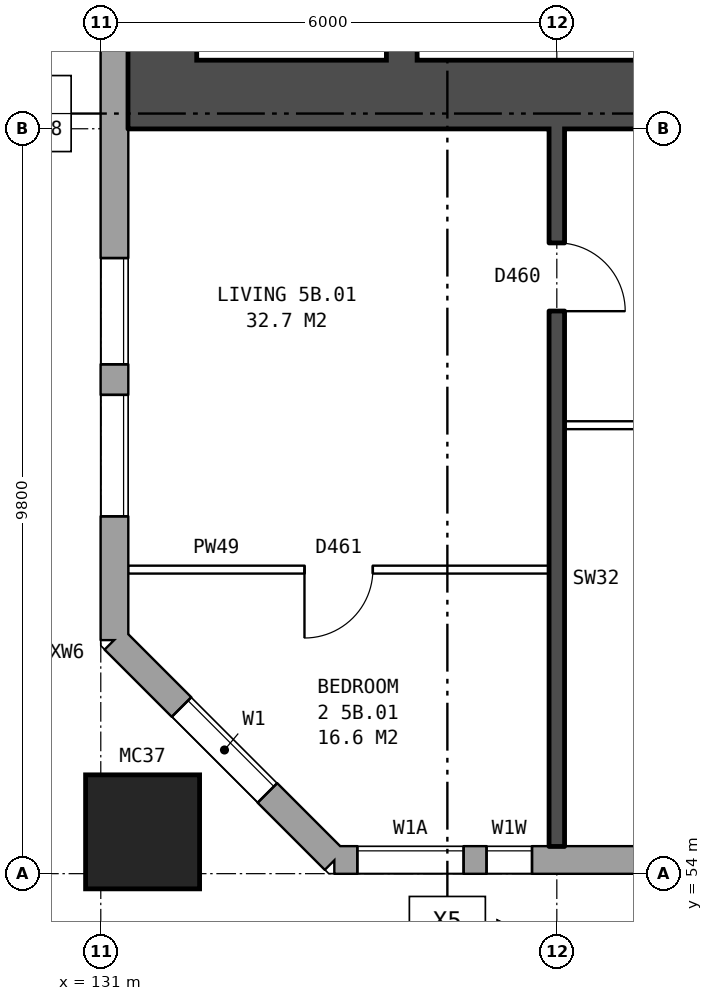
"""IFC4 building model, lengths in metres.
Left out: names, types, materials, properties, quantities, classifications, styles, units other than length and angle.
Written with IfcOpenShell. Run it as: python <this file> out.ifc"""

import sys

from ifc_helpers import new_model, si_unit, direction, frame, frame_2d, origin, origin_2d, place, context, subcontext, project, spatial, rectangle, hollow_rectangle, extrude, element, fill, save


model = new_model("IFC4")
c1 = context("Model", 3, precision=1e-05, world=origin(), true_north=direction((0.0, 1.0)))
c2 = subcontext(c1, "Body", "Model", "MODEL_VIEW")
j1 = project(units=[si_unit("LENGTHUNIT", "METRE"), si_unit("PLANEANGLEUNIT", "RADIAN")], contexts=[c1])
p1 = place(None, origin())
s1 = spatial("IfcSite", under=j1, at=p1, CompositionType="ELEMENT")
p2 = place(p1, origin())
s2 = spatial("IfcBuilding", under=s1, at=p2, CompositionType="ELEMENT")
p3 = place(p2, frame((0.0, 0.0, 22.6)))
s3 = spatial("IfcBuildingStorey", under=s2, at=p3, CompositionType="ELEMENT", Elevation=22.6)
p4 = place(p3, frame((131.55, 54.55, 0.0), z_axis=(0.0, 0.0, 1.0), x_axis=(1.0, 0.0, 0.0)))
e1 = element("IfcColumn", 1, at=p4, inside=s3, PredefinedType="COLUMN", context=c2, shape_type="SweptSolid", body=[
    extrude(hollow_rectangle(XDim=1.5, YDim=1.5, WallThickness=0.08, at=origin_2d()), origin(), (0.0, 0.0, 1.0), 3.1),
])
p5 = place(p3, frame((131.18, 57.075, 0.0), z_axis=(0.0, 0.0, 1.0), x_axis=(0.707106781187, -0.707106781187, 0.0)))
e2 = element("IfcWall", 2, at=p5, inside=s3, PredefinedType="STANDARD", context=c2, shape_type="SweptSolid", body=[
    extrude(rectangle(XDim=4.094, YDim=0.36, at=frame_2d((2.047, 0.0))), origin(), (0.0, 0.0, 1.0), 2.85),
])
p6 = place(p5, frame((1.247, 0.0, 0.8)))
e3 = element("IfcOpeningElement", 3, at=p6, cuts=e2, PredefinedType="OPENING", context=c2, shape_type="SweptSolid", body=[
    extrude(rectangle(XDim=1.6, YDim=1.8, at=frame_2d((0.8, 0.9))), frame((0.0, 0.19, 0.0), z_axis=(0.0, -1.0, 0.0), x_axis=(1.0, 0.0, 0.0)), (0.0, 0.0, 1.0), 0.38),
])
p7 = place(p3, frame((134.075, 54.18, 0.0), z_axis=(0.0, 0.0, 1.0), x_axis=(1.0, 0.0, 0.0)))
e4 = element("IfcWall", 4, at=p7, inside=s3, PredefinedType="STANDARD", context=c2, shape_type="SweptSolid", body=[
    extrude(rectangle(XDim=40.601, YDim=0.36, at=frame_2d((20.3, 0.0))), origin(), (0.0, 0.0, 1.0), 2.85),
])
p8 = place(p7, frame((0.3, 0.0, 0.8)))
e5 = element("IfcOpeningElement", 5, at=p8, cuts=e4, PredefinedType="OPENING", context=c2, shape_type="SweptSolid", body=[
    extrude(rectangle(XDim=1.4, YDim=1.8, at=frame_2d((0.7, 0.9))), frame((0.0, 0.19, 0.0), z_axis=(0.0, -1.0, 0.0), x_axis=(1.0, 0.0, 0.0)), (0.0, 0.0, 1.0), 0.38),
])
p9 = place(p7, frame((4.125, 0.0, 0.8)))
e6 = element("IfcOpeningElement", 6, at=p9, cuts=e4, PredefinedType="OPENING", context=c2, shape_type="SweptSolid", body=[
    extrude(rectangle(XDim=0.8, YDim=0.9, at=frame_2d((0.4, 0.45))), frame((0.0, 0.19, 0.0), z_axis=(0.0, -1.0, 0.0), x_axis=(1.0, 0.0, 0.0)), (0.0, 0.0, 1.0), 0.38),
])
p10 = place(p7, frame((6.625, 0.0, 0.8)))
e7 = element("IfcOpeningElement", 7, at=p10, cuts=e4, PredefinedType="OPENING", context=c2, shape_type="SweptSolid", body=[
    extrude(rectangle(XDim=1.6, YDim=1.8, at=frame_2d((0.8, 0.9))), frame((0.0, 0.19, 0.0), z_axis=(0.0, -1.0, 0.0), x_axis=(1.0, 0.0, 0.0)), (0.0, 0.0, 1.0), 0.38),
])
p11 = place(p7, frame((9.625, 0.0, 0.8)))
e8 = element("IfcOpeningElement", 8, at=p11, cuts=e4, PredefinedType="OPENING", context=c2, shape_type="SweptSolid", body=[
    extrude(rectangle(XDim=1.6, YDim=1.8, at=frame_2d((0.8, 0.9))), frame((0.0, 0.19, 0.0), z_axis=(0.0, -1.0, 0.0), x_axis=(1.0, 0.0, 0.0)), (0.0, 0.0, 1.0), 0.38),
])
p12 = place(p7, frame((12.625, 0.0, 0.8)))
e9 = element("IfcOpeningElement", 9, at=p12, cuts=e4, PredefinedType="OPENING", context=c2, shape_type="SweptSolid", body=[
    extrude(rectangle(XDim=1.6, YDim=1.8, at=frame_2d((0.8, 0.9))), frame((0.0, 0.19, 0.0), z_axis=(0.0, -1.0, 0.0), x_axis=(1.0, 0.0, 0.0)), (0.0, 0.0, 1.0), 0.38),
])
p13 = place(p7, frame((15.625, 0.0, 0.8)))
e10 = element("IfcOpeningElement", 10, at=p13, cuts=e4, PredefinedType="OPENING", context=c2, shape_type="SweptSolid", body=[
    extrude(rectangle(XDim=1.6, YDim=1.8, at=frame_2d((0.8, 0.9))), frame((0.0, 0.19, 0.0), z_axis=(0.0, -1.0, 0.0), x_axis=(1.0, 0.0, 0.0)), (0.0, 0.0, 1.0), 0.38),
])
p14 = place(p7, frame((18.625, 0.0, 0.8)))
e11 = element("IfcOpeningElement", 11, at=p14, cuts=e4, PredefinedType="OPENING", context=c2, shape_type="SweptSolid", body=[
    extrude(rectangle(XDim=1.6, YDim=1.8, at=frame_2d((0.8, 0.9))), frame((0.0, 0.19, 0.0), z_axis=(0.0, -1.0, 0.0), x_axis=(1.0, 0.0, 0.0)), (0.0, 0.0, 1.0), 0.38),
])
p15 = place(p7, frame((21.625, 0.0, 0.8)))
e12 = element("IfcOpeningElement", 12, at=p15, cuts=e4, PredefinedType="OPENING", context=c2, shape_type="SweptSolid", body=[
    extrude(rectangle(XDim=1.6, YDim=1.8, at=frame_2d((0.8, 0.9))), frame((0.0, 0.19, 0.0), z_axis=(0.0, -1.0, 0.0), x_axis=(1.0, 0.0, 0.0)), (0.0, 0.0, 1.0), 0.38),
])
p16 = place(p7, frame((24.625, 0.0, 0.8)))
e13 = element("IfcOpeningElement", 13, at=p16, cuts=e4, PredefinedType="OPENING", context=c2, shape_type="SweptSolid", body=[
    extrude(rectangle(XDim=1.6, YDim=1.8, at=frame_2d((0.8, 0.9))), frame((0.0, 0.19, 0.0), z_axis=(0.0, -1.0, 0.0), x_axis=(1.0, 0.0, 0.0)), (0.0, 0.0, 1.0), 0.38),
])
p17 = place(p7, frame((27.625, 0.0, 0.8)))
e14 = element("IfcOpeningElement", 14, at=p17, cuts=e4, PredefinedType="OPENING", context=c2, shape_type="SweptSolid", body=[
    extrude(rectangle(XDim=1.6, YDim=1.8, at=frame_2d((0.8, 0.9))), frame((0.0, 0.19, 0.0), z_axis=(0.0, -1.0, 0.0), x_axis=(1.0, 0.0, 0.0)), (0.0, 0.0, 1.0), 0.38),
])
p18 = place(p7, frame((30.625, 0.0, 0.8)))
e15 = element("IfcOpeningElement", 15, at=p18, cuts=e4, PredefinedType="OPENING", context=c2, shape_type="SweptSolid", body=[
    extrude(rectangle(XDim=1.6, YDim=1.8, at=frame_2d((0.8, 0.9))), frame((0.0, 0.19, 0.0), z_axis=(0.0, -1.0, 0.0), x_axis=(1.0, 0.0, 0.0)), (0.0, 0.0, 1.0), 0.38),
])
p19 = place(p7, frame((33.625, 0.0, 0.8)))
e16 = element("IfcOpeningElement", 16, at=p19, cuts=e4, PredefinedType="OPENING", context=c2, shape_type="SweptSolid", body=[
    extrude(rectangle(XDim=1.6, YDim=1.8, at=frame_2d((0.8, 0.9))), frame((0.0, 0.19, 0.0), z_axis=(0.0, -1.0, 0.0), x_axis=(1.0, 0.0, 0.0)), (0.0, 0.0, 1.0), 0.38),
])
p20 = place(p7, frame((35.525, 0.0, 0.8)))
e17 = element("IfcOpeningElement", 17, at=p20, cuts=e4, PredefinedType="OPENING", context=c2, shape_type="SweptSolid", body=[
    extrude(rectangle(XDim=0.6, YDim=1.2, at=frame_2d((0.3, 0.6))), frame((0.0, 0.19, 0.0), z_axis=(0.0, -1.0, 0.0), x_axis=(1.0, 0.0, 0.0)), (0.0, 0.0, 1.0), 0.38),
])
p21 = place(p7, frame((2.0, 0.0, 1.5)))
e18 = element("IfcOpeningElement", 18, at=p21, cuts=e4, PredefinedType="OPENING", context=c2, shape_type="SweptSolid", body=[
    extrude(rectangle(XDim=0.6, YDim=0.9, at=frame_2d((0.3, 0.45))), frame((0.0, 0.19, 0.0), z_axis=(0.0, -1.0, 0.0), x_axis=(1.0, 0.0, 0.0)), (0.0, 0.0, 1.0), 0.38),
])
p22 = place(p7, frame((5.225, 0.0, 0.8)))
e19 = element("IfcOpeningElement", 19, at=p22, cuts=e4, PredefinedType="OPENING", context=c2, shape_type="SweptSolid", body=[
    extrude(rectangle(XDim=1.0, YDim=1.8, at=frame_2d((0.5, 0.9))), frame((0.0, 0.19, 0.0), z_axis=(0.0, -1.0, 0.0), x_axis=(1.0, 0.0, 0.0)), (0.0, 0.0, 1.0), 0.38),
])
p23 = place(p7, frame((37.725, 0.0, 1.7)))
e20 = element("IfcOpeningElement", 20, at=p23, cuts=e4, PredefinedType="OPENING", context=c2, shape_type="SweptSolid", body=[
    extrude(rectangle(XDim=1.0, YDim=0.9, at=frame_2d((0.5, 0.45))), frame((0.0, 0.19, 0.0), z_axis=(0.0, -1.0, 0.0), x_axis=(1.0, 0.0, 0.0)), (0.0, 0.0, 1.0), 0.38),
])
p24 = place(p3, frame((131.18, 82.925, 0.0), z_axis=(0.0, 0.0, 1.0), x_axis=(0.0, -1.0, 0.0)))
e21 = element("IfcWall", 21, at=p24, inside=s3, PredefinedType="STANDARD", context=c2, shape_type="SweptSolid", body=[
    extrude(rectangle(XDim=25.851, YDim=0.36, at=frame_2d((12.925, 0.0))), origin(), (0.0, 0.0, 1.0), 2.85),
])
p25 = place(p24, frame((1.625, 0.0, 0.8)))
e22 = element("IfcOpeningElement", 22, at=p25, cuts=e21, PredefinedType="OPENING", context=c2, shape_type="SweptSolid", body=[
    extrude(rectangle(XDim=1.6, YDim=1.8, at=frame_2d((0.8, 0.9))), frame((0.0, 0.19, 0.0), z_axis=(0.0, -1.0, 0.0), x_axis=(1.0, 0.0, 0.0)), (0.0, 0.0, 1.0), 0.38),
])
p26 = place(p24, frame((3.525, 0.0, 1.7)))
e23 = element("IfcOpeningElement", 23, at=p26, cuts=e21, PredefinedType="OPENING", context=c2, shape_type="SweptSolid", body=[
    extrude(rectangle(XDim=1.4, YDim=0.9, at=frame_2d((0.7, 0.45))), frame((0.0, 0.19, 0.0), z_axis=(0.0, -1.0, 0.0), x_axis=(1.0, 0.0, 0.0)), (0.0, 0.0, 1.0), 0.38),
])
p27 = place(p24, frame((20.825, 0.0, 1.7)))
e24 = element("IfcOpeningElement", 24, at=p27, cuts=e21, PredefinedType="OPENING", context=c2, shape_type="SweptSolid", body=[
    extrude(rectangle(XDim=1.4, YDim=0.9, at=frame_2d((0.7, 0.45))), frame((0.0, 0.19, 0.0), z_axis=(0.0, -1.0, 0.0), x_axis=(1.0, 0.0, 0.0)), (0.0, 0.0, 1.0), 0.38),
])
p28 = place(p24, frame((22.625, 0.0, 0.8)))
e25 = element("IfcOpeningElement", 25, at=p28, cuts=e21, PredefinedType="OPENING", context=c2, shape_type="SweptSolid", body=[
    extrude(rectangle(XDim=1.6, YDim=1.8, at=frame_2d((0.8, 0.9))), frame((0.0, 0.19, 0.0), z_axis=(0.0, -1.0, 0.0), x_axis=(1.0, 0.0, 0.0)), (0.0, 0.0, 1.0), 0.38),
])
p29 = place(p3, frame((131.81, 64.7, 0.0), z_axis=(0.0, 0.0, 1.0), x_axis=(0.0, 1.0, 0.0)))
e26 = element("IfcWall", 26, at=p29, inside=s3, PredefinedType="SHEAR", context=c2, shape_type="SweptSolid", body=[
    extrude(rectangle(XDim=10.6, YDim=0.9, at=frame_2d((5.3, 0.0))), origin(), (0.0, 0.0, 1.0), 2.85),
])
p30 = place(p3, frame((139.76, 64.25, 0.0), z_axis=(0.0, 0.0, 1.0), x_axis=(-1.0, 0.0, 0.0)))
e27 = element("IfcWall", 27, at=p30, inside=s3, PredefinedType="SHEAR", context=c2, shape_type="SweptSolid", body=[
    extrude(rectangle(XDim=8.4, YDim=0.9, at=frame_2d((4.2, 0.0))), origin(), (0.0, 0.0, 1.0), 2.85),
])
p31 = place(p3, frame((134.96, 64.7, 0.0), z_axis=(0.0, 0.0, 1.0), x_axis=(0.0, 1.0, 0.0)))
e28 = element("IfcWall", 28, at=p31, inside=s3, PredefinedType="SHEAR", context=c2, shape_type="SweptSolid", body=[
    extrude(rectangle(XDim=6.35, YDim=0.4, at=frame_2d((3.175, 0.0))), origin(), (0.0, 0.0, 1.0), 2.85),
])
p32 = place(p3, frame((131.36, 58.0, 0.0), z_axis=(0.0, 0.0, 1.0), x_axis=(1.0, 0.0, 0.0)))
e29 = element("IfcWall", 29, at=p32, inside=s3, PredefinedType="PARTITIONING", context=c2, shape_type="SweptSolid", body=[
    extrude(rectangle(XDim=5.54, YDim=0.1, at=frame_2d((2.77, 0.0))), origin(), (0.0, 0.0, 1.0), 2.85),
])
p33 = place(p32, frame((2.32, 0.0, 0.0)))
e30 = element("IfcOpeningElement", 30, at=p33, cuts=e29, PredefinedType="OPENING", context=c2, shape_type="SweptSolid", body=[
    extrude(rectangle(XDim=0.9, YDim=2.1, at=frame_2d((0.45, 1.05))), frame((0.0, 0.06, 0.0), z_axis=(0.0, -1.0, 0.0), x_axis=(1.0, 0.0, 0.0)), (0.0, 0.0, 1.0), 0.12),
])
p34 = place(p3, frame((137.1, 59.9, 0.0), z_axis=(0.0, 0.0, 1.0), x_axis=(1.0, 0.0, 0.0)))
e31 = element("IfcWall", 31, at=p34, inside=s3, PredefinedType="PARTITIONING", context=c2, shape_type="SweptSolid", body=[
    extrude(rectangle(XDim=5.8, YDim=0.1, at=frame_2d((2.9, 0.0))), origin(), (0.0, 0.0, 1.0), 2.85),
])
p35 = place(p34, frame((1.3, 0.0, 0.0)))
e32 = element("IfcOpeningElement", 32, at=p35, cuts=e31, PredefinedType="OPENING", context=c2, shape_type="SweptSolid", body=[
    extrude(rectangle(XDim=0.9, YDim=2.1, at=frame_2d((0.45, 1.05))), frame((0.0, 0.06, 0.0), z_axis=(0.0, -1.0, 0.0), x_axis=(1.0, 0.0, 0.0)), (0.0, 0.0, 1.0), 0.12),
])
p36 = place(p34, frame((4.2, 0.0, 0.0)))
e33 = element("IfcOpeningElement", 33, at=p36, cuts=e31, PredefinedType="OPENING", context=c2, shape_type="SweptSolid", body=[
    extrude(rectangle(XDim=0.9, YDim=2.1, at=frame_2d((0.45, 1.05))), frame((0.0, 0.06, 0.0), z_axis=(0.0, -1.0, 0.0), x_axis=(1.0, 0.0, 0.0)), (0.0, 0.0, 1.0), 0.12),
])
p37 = place(p3, frame((137.0, 54.36, 0.0), z_axis=(0.0, 0.0, 1.0), x_axis=(0.0, 1.0, 0.0)))
e34 = element("IfcWall", 34, at=p37, inside=s3, PredefinedType="SOLIDWALL", context=c2, shape_type="SweptSolid", body=[
    extrude(rectangle(XDim=9.44, YDim=0.2, at=frame_2d((4.72, 0.0))), origin(), (0.0, 0.0, 1.0), 2.85),
])
p38 = place(p37, frame((7.04, 0.0, 0.0)))
e35 = element("IfcOpeningElement", 35, at=p38, cuts=e34, PredefinedType="OPENING", context=c2, shape_type="SweptSolid", body=[
    extrude(rectangle(XDim=0.9, YDim=2.1, at=frame_2d((0.45, 1.05))), frame((0.0, 0.11, 0.0), z_axis=(0.0, -1.0, 0.0), x_axis=(1.0, 0.0, 0.0)), (0.0, 0.0, 1.0), 0.22),
])
p39 = place(p6, origin())
e36 = element("IfcWindow", 36, at=p39, inside=s3, PartitioningType="SINGLE_PANEL", PredefinedType="WINDOW", context=c2, shape_type="SweptSolid", body=[
    extrude(rectangle(XDim=1.6, YDim=1.8, at=frame_2d((0.8, 0.9))), frame((0.0, 0.15, 0.0), z_axis=(0.0, -1.0, 0.0), x_axis=(1.0, 0.0, 0.0)), (0.0, 0.0, 1.0), 0.06),
])
fill(e3, e36)
p40 = place(p8, origin())
e37 = element("IfcWindow", 37, at=p40, inside=s3, PartitioningType="SINGLE_PANEL", PredefinedType="WINDOW", context=c2, shape_type="SweptSolid", body=[
    extrude(rectangle(XDim=1.4, YDim=1.8, at=frame_2d((0.7, 0.9))), frame((0.0, 0.15, 0.0), z_axis=(0.0, -1.0, 0.0), x_axis=(1.0, 0.0, 0.0)), (0.0, 0.0, 1.0), 0.06),
])
fill(e5, e37)
p41 = place(p27, origin())
e38 = element("IfcWindow", 38, at=p41, inside=s3, PartitioningType="SINGLE_PANEL", PredefinedType="WINDOW", context=c2, shape_type="SweptSolid", body=[
    extrude(rectangle(XDim=1.4, YDim=0.9, at=frame_2d((0.7, 0.45))), frame((0.0, 0.15, 0.0), z_axis=(0.0, -1.0, 0.0), x_axis=(1.0, 0.0, 0.0)), (0.0, 0.0, 1.0), 0.06),
])
fill(e24, e38)
p42 = place(p28, origin())
e39 = element("IfcWindow", 39, at=p42, inside=s3, PartitioningType="SINGLE_PANEL", PredefinedType="WINDOW", context=c2, shape_type="SweptSolid", body=[
    extrude(rectangle(XDim=1.6, YDim=1.8, at=frame_2d((0.8, 0.9))), frame((0.0, 0.15, 0.0), z_axis=(0.0, -1.0, 0.0), x_axis=(1.0, 0.0, 0.0)), (0.0, 0.0, 1.0), 0.06),
])
fill(e25, e39)
p43 = place(p33, frame((0.9, 0.0, 0.0), z_axis=(0.0, 0.0, 1.0), x_axis=(-1.0, 0.0, 0.0)))
e40 = element("IfcDoor", 40, at=p43, inside=s3, OperationType="SINGLE_SWING_RIGHT", PredefinedType="DOOR", context=c2, shape_type="SweptSolid", body=[
    extrude(rectangle(XDim=0.9, YDim=2.1, at=frame_2d((0.45, 1.05))), frame((0.0, 0.025, 0.0), z_axis=(0.0, -1.0, 0.0), x_axis=(1.0, 0.0, 0.0)), (0.0, 0.0, 1.0), 0.05),
])
fill(e30, e40)
p44 = place(p38, frame((0.9, 0.0, 0.0), z_axis=(0.0, 0.0, 1.0), x_axis=(-1.0, 0.0, 0.0)))
e41 = element("IfcDoor", 41, at=p44, inside=s3, OperationType="SINGLE_SWING_RIGHT", PredefinedType="DOOR", context=c2, shape_type="SweptSolid", body=[
    extrude(rectangle(XDim=0.9, YDim=2.1, at=frame_2d((0.45, 1.05))), frame((0.0, 0.025, 0.0), z_axis=(0.0, -1.0, 0.0), x_axis=(1.0, 0.0, 0.0)), (0.0, 0.0, 1.0), 0.05),
])
fill(e35, e41)
p45 = place(p21, origin())
e42 = element("IfcWindow", 42, at=p45, inside=s3, PartitioningType="SINGLE_PANEL", PredefinedType="WINDOW", context=c2, shape_type="SweptSolid", body=[
    extrude(rectangle(XDim=0.6, YDim=0.9, at=frame_2d((0.3, 0.45))), frame((0.0, 0.15, 0.0), z_axis=(0.0, -1.0, 0.0), x_axis=(1.0, 0.0, 0.0)), (0.0, 0.0, 1.0), 0.06),
])
fill(e18, e42)
save(model, sys.argv[1])
